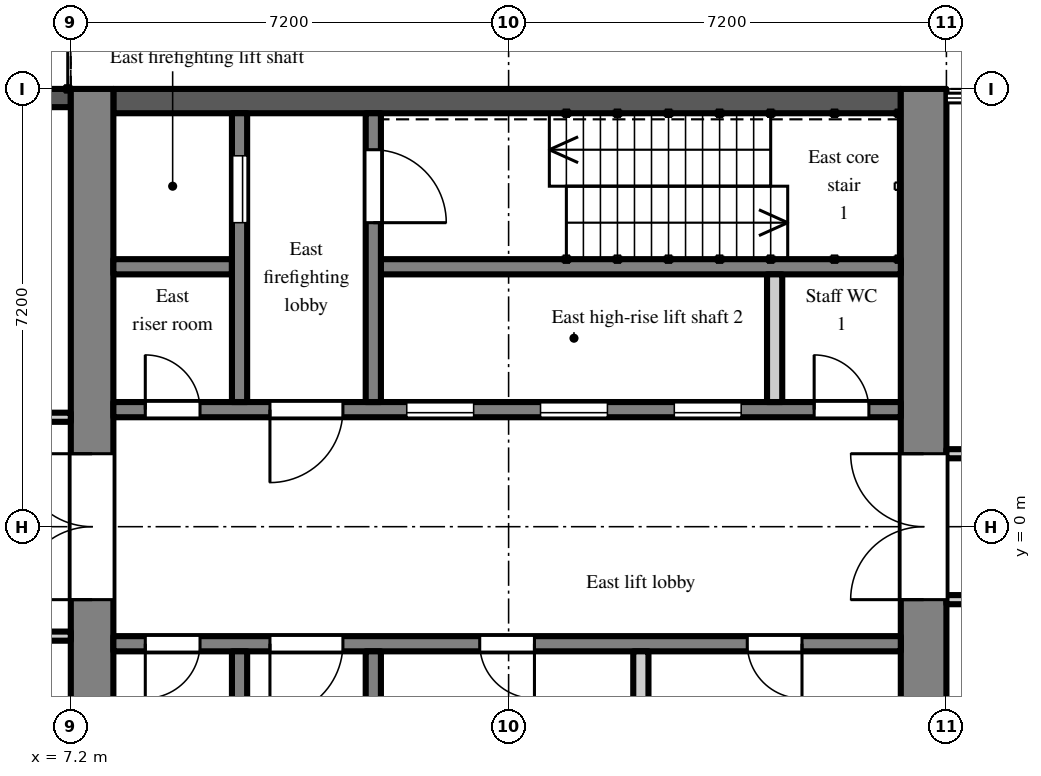
"""IFC4 building model, lengths in metres.
Left out: names, types, materials, properties, quantities, classifications, styles, units other than length and angle.
Written with IfcOpenShell. Run it as: python <this file> out.ifc"""

import sys

from ifc_helpers import new_model, si_unit, direction, frame, frame_2d, origin, place, context, subcontext, project, spatial, rectangle, extrude, element, fill, save


model = new_model("IFC4")
c1 = context("Model", 3, precision=1e-05, world=origin(), true_north=direction((0.0, 1.0)))
c2 = subcontext(c1, "Body", "Model", "MODEL_VIEW")
j1 = project(units=[si_unit("LENGTHUNIT", "METRE"), si_unit("PLANEANGLEUNIT", "RADIAN")], contexts=[c1])
p1 = place(None, origin())
s1 = spatial("IfcSite", under=j1, at=p1, CompositionType="ELEMENT")
p2 = place(p1, origin())
s2 = spatial("IfcBuilding", under=s1, at=p2, CompositionType="ELEMENT")
p3 = place(p2, frame((0.0, 0.0, 237.9)))
s3 = spatial("IfcBuildingStorey", under=s2, at=p3, CompositionType="ELEMENT", Elevation=237.9)
p4 = place(p3, frame((7.2, 7.05, 0.0), z_axis=(0.0, 0.0, 1.0), x_axis=(-1.0, 0.0, 0.0)))
e1 = element("IfcWall", 1, at=p4, inside=s3, PredefinedType="SOLIDWALL", context=c2, shape_type="SweptSolid", body=[
    extrude(rectangle(XDim=3.0, YDim=0.3, at=frame_2d((1.5, 0.0))), origin(), (0.0, 0.0, 1.0), 3.75),
])
p5 = place(p3, frame((7.55, -7.2, 0.0), z_axis=(0.0, 0.0, 1.0), x_axis=(0.0, 1.0, 0.0)))
e2 = element("IfcWall", 2, at=p5, inside=s3, PredefinedType="SHEAR", context=c2, shape_type="SweptSolid", body=[
    extrude(rectangle(XDim=14.4, YDim=0.7, at=frame_2d((7.2, 0.0))), origin(), (0.0, 0.0, 1.0), 3.75),
])
p6 = place(p5, frame((6.0, 0.0, 0.0)))
e3 = element("IfcOpeningElement", 3, at=p6, cuts=e2, PredefinedType="OPENING", context=c2, shape_type="SweptSolid", body=[
    extrude(rectangle(XDim=2.4, YDim=2.2, at=frame_2d((1.2, 1.1))), frame((0.0, 0.36, 0.0), z_axis=(0.0, -1.0, 0.0), x_axis=(1.0, 0.0, 0.0)), (0.0, 0.0, 1.0), 0.72),
])
p7 = place(p3, frame((21.225, -7.2, 0.0), z_axis=(0.0, 0.0, 1.0), x_axis=(0.0, 1.0, 0.0)))
e4 = element("IfcWall", 4, at=p7, inside=s3, PredefinedType="SHEAR", context=c2, shape_type="SweptSolid", body=[
    extrude(rectangle(XDim=14.4, YDim=0.75, at=frame_2d((7.2, 0.0))), origin(), (0.0, 0.0, 1.0), 3.75),
])
p8 = place(p7, frame((6.0, 0.0, 0.0)))
e5 = element("IfcOpeningElement", 5, at=p8, cuts=e4, PredefinedType="OPENING", context=c2, shape_type="SweptSolid", body=[
    extrude(rectangle(XDim=2.4, YDim=2.2, at=frame_2d((1.2, 1.1))), frame((0.0, 0.385, 0.0), z_axis=(0.0, -1.0, 0.0), x_axis=(1.0, 0.0, 0.0)), (0.0, 0.0, 1.0), 0.77),
])
p9 = place(p3, frame((7.9, 7.0, 0.0), z_axis=(0.0, 0.0, 1.0), x_axis=(1.0, 0.0, 0.0)))
e6 = element("IfcWall", 6, at=p9, inside=s3, PredefinedType="SHEAR", context=c2, shape_type="SweptSolid", body=[
    extrude(rectangle(XDim=12.95, YDim=0.4, at=frame_2d((6.475, 0.0))), origin(), (0.0, 0.0, 1.0), 3.75),
])
p10 = place(p3, frame((7.9, 1.925, 0.0), z_axis=(0.0, 0.0, 1.0), x_axis=(1.0, 0.0, 0.0)))
e7 = element("IfcWall", 7, at=p10, inside=s3, PredefinedType="SHEAR", context=c2, shape_type="SweptSolid", body=[
    extrude(rectangle(XDim=12.95, YDim=0.25, at=frame_2d((6.475, 0.0))), origin(), (0.0, 0.0, 1.0), 3.75),
])
p11 = place(p10, frame((4.825, 0.0, 0.0)))
e8 = element("IfcOpeningElement", 8, at=p11, cuts=e7, PredefinedType="OPENING", context=c2, shape_type="SweptSolid", body=[
    extrude(rectangle(XDim=1.1, YDim=2.1, at=frame_2d((0.55, 1.05))), frame((0.0, 0.135, 0.0), z_axis=(0.0, -1.0, 0.0), x_axis=(1.0, 0.0, 0.0)), (0.0, 0.0, 1.0), 0.27),
])
p12 = place(p10, frame((7.025, 0.0, 0.0)))
e9 = element("IfcOpeningElement", 9, at=p12, cuts=e7, PredefinedType="OPENING", context=c2, shape_type="SweptSolid", body=[
    extrude(rectangle(XDim=1.1, YDim=2.1, at=frame_2d((0.55, 1.05))), frame((0.0, 0.135, 0.0), z_axis=(0.0, -1.0, 0.0), x_axis=(1.0, 0.0, 0.0)), (0.0, 0.0, 1.0), 0.27),
])
p13 = place(p10, frame((9.225, 0.0, 0.0)))
e10 = element("IfcOpeningElement", 10, at=p13, cuts=e7, PredefinedType="OPENING", context=c2, shape_type="SweptSolid", body=[
    extrude(rectangle(XDim=1.1, YDim=2.1, at=frame_2d((0.55, 1.05))), frame((0.0, 0.135, 0.0), z_axis=(0.0, -1.0, 0.0), x_axis=(1.0, 0.0, 0.0)), (0.0, 0.0, 1.0), 0.27),
])
p14 = place(p10, frame((0.525, 0.0, 0.0)))
e11 = element("IfcOpeningElement", 11, at=p14, cuts=e7, PredefinedType="OPENING", context=c2, shape_type="SweptSolid", body=[
    extrude(rectangle(XDim=0.9, YDim=2.1, at=frame_2d((0.45, 1.05))), frame((0.0, 0.135, 0.0), z_axis=(0.0, -1.0, 0.0), x_axis=(1.0, 0.0, 0.0)), (0.0, 0.0, 1.0), 0.27),
])
p15 = place(p10, frame((2.575, 0.0, 0.0)))
e12 = element("IfcOpeningElement", 12, at=p15, cuts=e7, PredefinedType="OPENING", context=c2, shape_type="SweptSolid", body=[
    extrude(rectangle(XDim=1.2, YDim=2.1, at=frame_2d((0.6, 1.05))), frame((0.0, 0.135, 0.0), z_axis=(0.0, -1.0, 0.0), x_axis=(1.0, 0.0, 0.0)), (0.0, 0.0, 1.0), 0.27),
])
p16 = place(p10, frame((11.525, 0.0, 0.0)))
e13 = element("IfcOpeningElement", 13, at=p16, cuts=e7, PredefinedType="OPENING", context=c2, shape_type="SweptSolid", body=[
    extrude(rectangle(XDim=0.9, YDim=2.1, at=frame_2d((0.45, 1.05))), frame((0.0, 0.135, 0.0), z_axis=(0.0, -1.0, 0.0), x_axis=(1.0, 0.0, 0.0)), (0.0, 0.0, 1.0), 0.27),
])
p17 = place(p3, frame((7.9, 4.275, 0.0), z_axis=(0.0, 0.0, 1.0), x_axis=(1.0, 0.0, 0.0)))
e14 = element("IfcWall", 14, at=p17, inside=s3, PredefinedType="SHEAR", context=c2, shape_type="SweptSolid", body=[
    extrude(rectangle(XDim=1.95, YDim=0.25, at=frame_2d((0.975, 0.0))), origin(), (0.0, 0.0, 1.0), 3.75),
])
p18 = place(p3, frame((12.3, 4.275, 0.0), z_axis=(0.0, 0.0, 1.0), x_axis=(1.0, 0.0, 0.0)))
e15 = element("IfcWall", 15, at=p18, inside=s3, PredefinedType="SHEAR", context=c2, shape_type="SweptSolid", body=[
    extrude(rectangle(XDim=8.55, YDim=0.25, at=frame_2d((4.275, 0.0))), origin(), (0.0, 0.0, 1.0), 3.75),
])
p19 = place(p3, frame((9.975, 2.05, 0.0), z_axis=(0.0, 0.0, 1.0), x_axis=(0.0, 1.0, 0.0)))
e16 = element("IfcWall", 16, at=p19, inside=s3, PredefinedType="SHEAR", context=c2, shape_type="SweptSolid", body=[
    extrude(rectangle(XDim=4.75, YDim=0.25, at=frame_2d((2.375, 0.0))), origin(), (0.0, 0.0, 1.0), 3.75),
])
p20 = place(p19, frame((2.95, 0.0, 0.0)))
e17 = element("IfcOpeningElement", 17, at=p20, cuts=e16, PredefinedType="OPENING", context=c2, shape_type="SweptSolid", body=[
    extrude(rectangle(XDim=1.1, YDim=2.1, at=frame_2d((0.55, 1.05))), frame((0.0, 0.135, 0.0), z_axis=(0.0, -1.0, 0.0), x_axis=(1.0, 0.0, 0.0)), (0.0, 0.0, 1.0), 0.27),
])
p21 = place(p3, frame((12.175, 2.05, 0.0), z_axis=(0.0, 0.0, 1.0), x_axis=(0.0, 1.0, 0.0)))
e18 = element("IfcWall", 18, at=p21, inside=s3, PredefinedType="SHEAR", context=c2, shape_type="SweptSolid", body=[
    extrude(rectangle(XDim=4.75, YDim=0.25, at=frame_2d((2.375, 0.0))), origin(), (0.0, 0.0, 1.0), 3.75),
])
p22 = place(p21, frame((2.95, 0.0, 0.0)))
e19 = element("IfcOpeningElement", 19, at=p22, cuts=e18, PredefinedType="OPENING", context=c2, shape_type="SweptSolid", body=[
    extrude(rectangle(XDim=1.2, YDim=2.1, at=frame_2d((0.6, 1.05))), frame((0.0, 0.135, 0.0), z_axis=(0.0, -1.0, 0.0), x_axis=(1.0, 0.0, 0.0)), (0.0, 0.0, 1.0), 0.27),
])
p23 = place(p3, frame((18.775, 2.05, 0.0), z_axis=(0.0, 0.0, 1.0), x_axis=(0.0, 1.0, 0.0)))
e20 = element("IfcWall", 20, at=p23, inside=s3, PredefinedType="PARTITIONING", context=c2, shape_type="SweptSolid", body=[
    extrude(rectangle(XDim=2.1, YDim=0.25, at=frame_2d((1.05, 0.0))), origin(), (0.0, 0.0, 1.0), 3.75),
])
p24 = place(p3, frame((7.9, -1.925, 0.0), z_axis=(0.0, 0.0, 1.0), x_axis=(1.0, 0.0, 0.0)))
e21 = element("IfcWall", 21, at=p24, inside=s3, PredefinedType="SHEAR", context=c2, shape_type="SweptSolid", body=[
    extrude(rectangle(XDim=12.95, YDim=0.25, at=frame_2d((6.475, 0.0))), origin(), (0.0, 0.0, 1.0), 3.75),
])
p25 = place(p24, frame((0.525, 0.0, 0.0)))
e22 = element("IfcOpeningElement", 22, at=p25, cuts=e21, PredefinedType="OPENING", context=c2, shape_type="SweptSolid", body=[
    extrude(rectangle(XDim=0.9, YDim=2.1, at=frame_2d((0.45, 1.05))), frame((0.0, 0.135, 0.0), z_axis=(0.0, -1.0, 0.0), x_axis=(1.0, 0.0, 0.0)), (0.0, 0.0, 1.0), 0.27),
])
p26 = place(p24, frame((2.575, 0.0, 0.0)))
e23 = element("IfcOpeningElement", 23, at=p26, cuts=e21, PredefinedType="OPENING", context=c2, shape_type="SweptSolid", body=[
    extrude(rectangle(XDim=1.2, YDim=2.1, at=frame_2d((0.6, 1.05))), frame((0.0, 0.135, 0.0), z_axis=(0.0, -1.0, 0.0), x_axis=(1.0, 0.0, 0.0)), (0.0, 0.0, 1.0), 0.27),
])
p27 = place(p24, frame((6.025, 0.0, 0.0)))
e24 = element("IfcOpeningElement", 24, at=p27, cuts=e21, PredefinedType="OPENING", context=c2, shape_type="SweptSolid", body=[
    extrude(rectangle(XDim=0.9, YDim=2.1, at=frame_2d((0.45, 1.05))), frame((0.0, 0.135, 0.0), z_axis=(0.0, -1.0, 0.0), x_axis=(1.0, 0.0, 0.0)), (0.0, 0.0, 1.0), 0.27),
])
p28 = place(p24, frame((10.425, 0.0, 0.0)))
e25 = element("IfcOpeningElement", 25, at=p28, cuts=e21, PredefinedType="OPENING", context=c2, shape_type="SweptSolid", body=[
    extrude(rectangle(XDim=0.9, YDim=2.1, at=frame_2d((0.45, 1.05))), frame((0.0, 0.135, 0.0), z_axis=(0.0, -1.0, 0.0), x_axis=(1.0, 0.0, 0.0)), (0.0, 0.0, 1.0), 0.27),
])
p29 = place(p3, frame((9.975, -2.05, 0.0), z_axis=(0.0, 0.0, 1.0), x_axis=(0.0, -1.0, 0.0)))
e26 = element("IfcWall", 26, at=p29, inside=s3, PredefinedType="SHEAR", context=c2, shape_type="SweptSolid", body=[
    extrude(rectangle(XDim=4.75, YDim=0.25, at=frame_2d((2.375, 0.0))), origin(), (0.0, 0.0, 1.0), 3.75),
])
p30 = place(p29, frame((2.95, 0.0, 0.0)))
e27 = element("IfcOpeningElement", 27, at=p30, cuts=e26, PredefinedType="OPENING", context=c2, shape_type="SweptSolid", body=[
    extrude(rectangle(XDim=1.1, YDim=2.1, at=frame_2d((0.55, 1.05))), frame((0.0, 0.135, 0.0), z_axis=(0.0, -1.0, 0.0), x_axis=(1.0, 0.0, 0.0)), (0.0, 0.0, 1.0), 0.27),
])
p31 = place(p3, frame((12.175, -2.05, 0.0), z_axis=(0.0, 0.0, 1.0), x_axis=(0.0, -1.0, 0.0)))
e28 = element("IfcWall", 28, at=p31, inside=s3, PredefinedType="SHEAR", context=c2, shape_type="SweptSolid", body=[
    extrude(rectangle(XDim=4.75, YDim=0.25, at=frame_2d((2.375, 0.0))), origin(), (0.0, 0.0, 1.0), 3.75),
])
p32 = place(p31, frame((2.95, 0.0, 0.0)))
e29 = element("IfcOpeningElement", 29, at=p32, cuts=e28, PredefinedType="OPENING", context=c2, shape_type="SweptSolid", body=[
    extrude(rectangle(XDim=1.2, YDim=2.1, at=frame_2d((0.6, 1.05))), frame((0.0, 0.135, 0.0), z_axis=(0.0, -1.0, 0.0), x_axis=(1.0, 0.0, 0.0)), (0.0, 0.0, 1.0), 0.27),
])
p33 = place(p3, frame((16.575, -2.05, 0.0), z_axis=(0.0, 0.0, 1.0), x_axis=(0.0, -1.0, 0.0)))
e30 = element("IfcWall", 30, at=p33, inside=s3, PredefinedType="PARTITIONING", context=c2, shape_type="SweptSolid", body=[
    extrude(rectangle(XDim=2.1, YDim=0.25, at=frame_2d((1.05, 0.0))), origin(), (0.0, 0.0, 1.0), 3.75),
])
p34 = place(p3, frame((1.875, -1.8, 0.0), z_axis=(0.0, 0.0, 1.0), x_axis=(1.0, 0.0, 0.0)))
e31 = element("IfcWall", 31, at=p34, inside=s3, PredefinedType="PARTITIONING", context=c2, shape_type="SweptSolid", body=[
    extrude(rectangle(XDim=5.325, YDim=0.15, at=frame_2d((2.663, 0.0))), origin(), (0.0, 0.0, 1.0), 3.75),
])
p35 = place(p34, frame((0.1, 0.0, 0.0)))
e32 = element("IfcOpeningElement", 32, at=p35, cuts=e31, PredefinedType="OPENING", context=c2, shape_type="SweptSolid", body=[
    extrude(rectangle(XDim=0.9, YDim=2.1, at=frame_2d((0.45, 1.05))), frame((0.0, 0.085, 0.0), z_axis=(0.0, -1.0, 0.0), x_axis=(1.0, 0.0, 0.0)), (0.0, 0.0, 1.0), 0.17),
])
p36 = place(p34, frame((2.875, 0.0, 0.0)))
e33 = element("IfcOpeningElement", 33, at=p36, cuts=e31, PredefinedType="OPENING", context=c2, shape_type="SweptSolid", body=[
    extrude(rectangle(XDim=1.8, YDim=2.1, at=frame_2d((0.9, 1.05))), frame((0.0, 0.085, 0.0), z_axis=(0.0, -1.0, 0.0), x_axis=(1.0, 0.0, 0.0)), (0.0, 0.0, 1.0), 0.17),
])
p37 = place(p3, frame((1.875, 1.8, 0.0), z_axis=(0.0, 0.0, 1.0), x_axis=(1.0, 0.0, 0.0)))
e34 = element("IfcWall", 34, at=p37, inside=s3, PredefinedType="PARTITIONING", context=c2, shape_type="SweptSolid", body=[
    extrude(rectangle(XDim=5.325, YDim=0.15, at=frame_2d((2.663, 0.0))), origin(), (0.0, 0.0, 1.0), 3.75),
])
p38 = place(p37, frame((0.575, 0.0, 0.0)))
e35 = element("IfcOpeningElement", 35, at=p38, cuts=e34, PredefinedType="OPENING", context=c2, shape_type="SweptSolid", body=[
    extrude(rectangle(XDim=0.9, YDim=2.1, at=frame_2d((0.45, 1.05))), frame((0.0, 0.085, 0.0), z_axis=(0.0, -1.0, 0.0), x_axis=(1.0, 0.0, 0.0)), (0.0, 0.0, 1.0), 0.17),
])
p39 = place(p3, frame((21.6, -1.2, 0.0), z_axis=(0.0, 0.0, 1.0), x_axis=(1.0, 0.0, 0.0)))
e36 = element("IfcWall", 36, at=p39, inside=s3, PredefinedType="PARTITIONING", context=c2, shape_type="SweptSolid", body=[
    extrude(rectangle(XDim=3.525, YDim=0.15, at=frame_2d((1.762, 0.0))), origin(), (0.0, 0.0, 1.0), 3.75),
])
p40 = place(p39, frame((1.35, 0.0, 0.0)))
e37 = element("IfcOpeningElement", 37, at=p40, cuts=e36, PredefinedType="OPENING", context=c2, shape_type="SweptSolid", body=[
    extrude(rectangle(XDim=0.9, YDim=2.1, at=frame_2d((0.45, 1.05))), frame((0.0, 0.085, 0.0), z_axis=(0.0, -1.0, 0.0), x_axis=(1.0, 0.0, 0.0)), (0.0, 0.0, 1.0), 0.17),
])
p41 = place(p3, frame((21.6, 1.2, 0.0), z_axis=(0.0, 0.0, 1.0), x_axis=(1.0, 0.0, 0.0)))
e38 = element("IfcWall", 38, at=p41, inside=s3, PredefinedType="PARTITIONING", context=c2, shape_type="SweptSolid", body=[
    extrude(rectangle(XDim=3.525, YDim=0.15, at=frame_2d((1.762, 0.0))), origin(), (0.0, 0.0, 1.0), 3.75),
])
p42 = place(p41, frame((1.35, 0.0, 0.0)))
e39 = element("IfcOpeningElement", 39, at=p42, cuts=e38, PredefinedType="OPENING", context=c2, shape_type="SweptSolid", body=[
    extrude(rectangle(XDim=0.9, YDim=2.1, at=frame_2d((0.45, 1.05))), frame((0.0, 0.085, 0.0), z_axis=(0.0, -1.0, 0.0), x_axis=(1.0, 0.0, 0.0)), (0.0, 0.0, 1.0), 0.17),
])
p43 = place(p11, origin())
e40 = element("IfcDoor", 40, at=p43, inside=s3, OperationType="SLIDING_TO_LEFT", PredefinedType="DOOR", context=c2, shape_type="SweptSolid", body=[
    extrude(rectangle(XDim=1.1, YDim=2.1, at=frame_2d((0.55, 1.05))), frame((0.0, 0.025, 0.0), z_axis=(0.0, -1.0, 0.0), x_axis=(1.0, 0.0, 0.0)), (0.0, 0.0, 1.0), 0.05),
])
fill(e8, e40)
p44 = place(p12, origin())
e41 = element("IfcDoor", 41, at=p44, inside=s3, OperationType="SLIDING_TO_LEFT", PredefinedType="DOOR", context=c2, shape_type="SweptSolid", body=[
    extrude(rectangle(XDim=1.1, YDim=2.1, at=frame_2d((0.55, 1.05))), frame((0.0, 0.025, 0.0), z_axis=(0.0, -1.0, 0.0), x_axis=(1.0, 0.0, 0.0)), (0.0, 0.0, 1.0), 0.05),
])
fill(e9, e41)
p45 = place(p13, origin())
e42 = element("IfcDoor", 42, at=p45, inside=s3, OperationType="SLIDING_TO_LEFT", PredefinedType="DOOR", context=c2, shape_type="SweptSolid", body=[
    extrude(rectangle(XDim=1.1, YDim=2.1, at=frame_2d((0.55, 1.05))), frame((0.0, 0.025, 0.0), z_axis=(0.0, -1.0, 0.0), x_axis=(1.0, 0.0, 0.0)), (0.0, 0.0, 1.0), 0.05),
])
fill(e10, e42)
p46 = place(p20, origin())
e43 = element("IfcDoor", 43, at=p46, inside=s3, OperationType="SLIDING_TO_LEFT", PredefinedType="DOOR", context=c2, shape_type="SweptSolid", body=[
    extrude(rectangle(XDim=1.1, YDim=2.1, at=frame_2d((0.55, 1.05))), frame((0.0, 0.025, 0.0), z_axis=(0.0, -1.0, 0.0), x_axis=(1.0, 0.0, 0.0)), (0.0, 0.0, 1.0), 0.05),
])
fill(e17, e43)
p47 = place(p22, frame((1.2, 0.0, 0.0), z_axis=(0.0, 0.0, 1.0), x_axis=(-1.0, 0.0, 0.0)))
e44 = element("IfcDoor", 44, at=p47, inside=s3, OperationType="SINGLE_SWING_RIGHT", PredefinedType="DOOR", context=c2, shape_type="SweptSolid", body=[
    extrude(rectangle(XDim=1.2, YDim=2.1, at=frame_2d((0.6, 1.05))), frame((0.0, 0.025, 0.0), z_axis=(0.0, -1.0, 0.0), x_axis=(1.0, 0.0, 0.0)), (0.0, 0.0, 1.0), 0.05),
])
fill(e19, e44)
p48 = place(p14, origin())
e45 = element("IfcDoor", 45, at=p48, inside=s3, OperationType="SINGLE_SWING_LEFT", PredefinedType="DOOR", context=c2, shape_type="SweptSolid", body=[
    extrude(rectangle(XDim=0.9, YDim=2.1, at=frame_2d((0.45, 1.05))), frame((0.0, 0.025, 0.0), z_axis=(0.0, -1.0, 0.0), x_axis=(1.0, 0.0, 0.0)), (0.0, 0.0, 1.0), 0.05),
])
fill(e11, e45)
p49 = place(p25, frame((0.9, 0.0, 0.0), z_axis=(0.0, 0.0, 1.0), x_axis=(-1.0, 0.0, 0.0)))
e46 = element("IfcDoor", 46, at=p49, inside=s3, OperationType="SINGLE_SWING_RIGHT", PredefinedType="DOOR", context=c2, shape_type="SweptSolid", body=[
    extrude(rectangle(XDim=0.9, YDim=2.1, at=frame_2d((0.45, 1.05))), frame((0.0, 0.025, 0.0), z_axis=(0.0, -1.0, 0.0), x_axis=(1.0, 0.0, 0.0)), (0.0, 0.0, 1.0), 0.05),
])
fill(e22, e46)
p50 = place(p15, frame((1.2, 0.0, 0.0), z_axis=(0.0, 0.0, 1.0), x_axis=(-1.0, 0.0, 0.0)))
e47 = element("IfcDoor", 47, at=p50, inside=s3, OperationType="SINGLE_SWING_RIGHT", PredefinedType="DOOR", context=c2, shape_type="SweptSolid", body=[
    extrude(rectangle(XDim=1.2, YDim=2.1, at=frame_2d((0.6, 1.05))), frame((0.0, 0.025, 0.0), z_axis=(0.0, -1.0, 0.0), x_axis=(1.0, 0.0, 0.0)), (0.0, 0.0, 1.0), 0.05),
])
fill(e12, e47)
p51 = place(p26, frame((1.2, 0.0, 0.0), z_axis=(0.0, 0.0, 1.0), x_axis=(-1.0, 0.0, 0.0)))
e48 = element("IfcDoor", 48, at=p51, inside=s3, OperationType="SINGLE_SWING_RIGHT", PredefinedType="DOOR", context=c2, shape_type="SweptSolid", body=[
    extrude(rectangle(XDim=1.2, YDim=2.1, at=frame_2d((0.6, 1.05))), frame((0.0, 0.025, 0.0), z_axis=(0.0, -1.0, 0.0), x_axis=(1.0, 0.0, 0.0)), (0.0, 0.0, 1.0), 0.05),
])
fill(e23, e48)
p52 = place(p6, origin())
e49 = element("IfcDoor", 49, at=p52, inside=s3, OperationType="DOUBLE_DOOR_DOUBLE_SWING", PredefinedType="DOOR", context=c2, shape_type="SweptSolid", body=[
    extrude(rectangle(XDim=2.4, YDim=2.2, at=frame_2d((1.2, 1.1))), frame((0.0, 0.025, 0.0), z_axis=(0.0, -1.0, 0.0), x_axis=(1.0, 0.0, 0.0)), (0.0, 0.0, 1.0), 0.05),
])
fill(e3, e49)
p53 = place(p8, origin())
e50 = element("IfcDoor", 50, at=p53, inside=s3, OperationType="DOUBLE_DOOR_DOUBLE_SWING", PredefinedType="DOOR", context=c2, shape_type="SweptSolid", body=[
    extrude(rectangle(XDim=2.4, YDim=2.2, at=frame_2d((1.2, 1.1))), frame((0.0, 0.025, 0.0), z_axis=(0.0, -1.0, 0.0), x_axis=(1.0, 0.0, 0.0)), (0.0, 0.0, 1.0), 0.05),
])
fill(e5, e50)
p54 = place(p16, origin())
e51 = element("IfcDoor", 51, at=p54, inside=s3, OperationType="SINGLE_SWING_LEFT", PredefinedType="DOOR", context=c2, shape_type="SweptSolid", body=[
    extrude(rectangle(XDim=0.9, YDim=2.1, at=frame_2d((0.45, 1.05))), frame((0.0, 0.025, 0.0), z_axis=(0.0, -1.0, 0.0), x_axis=(1.0, 0.0, 0.0)), (0.0, 0.0, 1.0), 0.05),
])
fill(e13, e51)
p55 = place(p27, frame((0.9, 0.0, 0.0), z_axis=(0.0, 0.0, 1.0), x_axis=(-1.0, 0.0, 0.0)))
e52 = element("IfcDoor", 52, at=p55, inside=s3, OperationType="SINGLE_SWING_LEFT", PredefinedType="DOOR", context=c2, shape_type="SweptSolid", body=[
    extrude(rectangle(XDim=0.9, YDim=2.1, at=frame_2d((0.45, 1.05))), frame((0.0, 0.025, 0.0), z_axis=(0.0, -1.0, 0.0), x_axis=(1.0, 0.0, 0.0)), (0.0, 0.0, 1.0), 0.05),
])
fill(e24, e52)
p56 = place(p28, frame((0.9, 0.0, 0.0), z_axis=(0.0, 0.0, 1.0), x_axis=(-1.0, 0.0, 0.0)))
e53 = element("IfcDoor", 53, at=p56, inside=s3, OperationType="SINGLE_SWING_LEFT", PredefinedType="DOOR", context=c2, shape_type="SweptSolid", body=[
    extrude(rectangle(XDim=0.9, YDim=2.1, at=frame_2d((0.45, 1.05))), frame((0.0, 0.025, 0.0), z_axis=(0.0, -1.0, 0.0), x_axis=(1.0, 0.0, 0.0)), (0.0, 0.0, 1.0), 0.05),
])
fill(e25, e53)
save(model, sys.argv[1])
